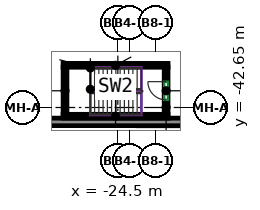
"""IFC4 building model, lengths in metres.
Left out: names, types, materials, properties, quantities, classifications, styles, units other than length and angle.
Written with IfcOpenShell. Run it as: python <this file> out.ifc"""

import sys

from ifc_helpers import new_model, si_unit, direction, frame, frame_2d, origin, place, context, subcontext, project, spatial, rectangle, extrude, source, transform, mapped, element, fill, save


model = new_model("IFC4")
c1 = context("Model", 3, precision=1e-05, world=origin(), true_north=direction((0.0, 1.0)))
c2 = subcontext(c1, "Body", "Model", "MODEL_VIEW")
j1 = project(units=[si_unit("LENGTHUNIT", "METRE"), si_unit("PLANEANGLEUNIT", "RADIAN")], contexts=[c1])
p1 = place(None, origin())
s1 = spatial("IfcSite", under=j1, at=p1, CompositionType="ELEMENT")
p2 = place(p1, origin())
s2 = spatial("IfcBuilding", under=s1, at=p2, CompositionType="ELEMENT")
p3 = place(p2, frame((0.0, 0.0, -4.5)))
s3 = spatial("IfcBuildingStorey", under=s2, at=p3, CompositionType="ELEMENT", Elevation=-4.5)
m1 = source(origin(), c2, "Body", "SweptSolid", [
    extrude(rectangle(XDim=89.85, YDim=0.5, at=frame_2d((44.925, 0.0))), origin(), (0.0, 0.0, 1.0), 4.5),
])
p4 = place(p3, frame((-57.15, -43.6, 0.0), z_axis=(0.0, 0.0, 1.0), x_axis=(1.0, 0.0, 0.0)))
e1 = element("IfcWall", 1, at=p4, inside=s3, PredefinedType="SOLIDWALL", context=c2, shape_type="MappedRepresentation", body=[
    mapped(m1, transform((0.0, 0.0, 0.0))),
])
m2 = source(origin(), c2, "Body", "SweptSolid", [
    extrude(rectangle(XDim=6.9, YDim=0.25, at=frame_2d((3.45, 0.0))), origin(), (0.0, 0.0, 1.0), 4.09),
])
for number, where, z_axis, x_axis in (
    (2, (-28.1, -43.225, 0.0), (0.0, 0.0, 1.0), (1.0, 0.0, 0.0)),
    (3, (-28.1, -39.875, 0.0), (0.0, 0.0, 1.0), (1.0, 0.0, 0.0)),
):
    element("IfcWall", number, at=place(p3, frame(where, z_axis=z_axis, x_axis=x_axis)), inside=s3, PredefinedType="SHEAR", context=c2, shape_type="MappedRepresentation", body=[
        mapped(m2, transform((0.0, 0.0, 0.0))),
    ])
m3 = source(origin(), c2, "Body", "SweptSolid", [
    extrude(rectangle(XDim=3.1, YDim=0.25, at=frame_2d((1.55, 0.0))), origin(), (0.0, 0.0, 1.0), 4.09),
])
p5 = place(p3, frame((-27.975, -43.1, 0.0), z_axis=(0.0, 0.0, 1.0), x_axis=(0.0, 1.0, 0.0)))
e4 = element("IfcWall", 4, at=p5, inside=s3, PredefinedType="SHEAR", context=c2, shape_type="MappedRepresentation", body=[
    mapped(m3, transform((0.0, 0.0, 0.0))),
])
p6 = place(p3, frame((-21.325, -43.1, 0.0), z_axis=(0.0, 0.0, 1.0), x_axis=(0.0, 1.0, 0.0)))
e5 = element("IfcWall", 5, at=p6, inside=s3, PredefinedType="SHEAR", context=c2, shape_type="MappedRepresentation", body=[
    mapped(m3, transform((0.0, 0.0, 0.0))),
])
p7 = place(p6, frame((0.95, 0.0, 0.0)))
e6 = element("IfcOpeningElement", 6, at=p7, cuts=e5, PredefinedType="OPENING", context=c2, shape_type="SweptSolid", body=[
    extrude(rectangle(XDim=1.2, YDim=2.1, at=frame_2d((0.6, 1.05))), frame((0.0, 0.135, 0.0), z_axis=(0.0, -1.0, 0.0), x_axis=(1.0, 0.0, 0.0)), (0.0, 0.0, 1.0), 0.27),
])
p8 = place(p7, origin())
e7 = element("IfcDoor", 7, at=p8, inside=s3, OperationType="SINGLE_SWING_RIGHT", PredefinedType="DOOR", context=c2, shape_type="SweptSolid", body=[
    extrude(rectangle(XDim=1.2, YDim=2.1, at=frame_2d((0.6, 1.05))), frame((0.0, 0.025, 0.0), z_axis=(0.0, -1.0, 0.0), x_axis=(1.0, 0.0, 0.0)), (0.0, 0.0, 1.0), 0.05),
])
fill(e6, e7)
save(model, sys.argv[1])
